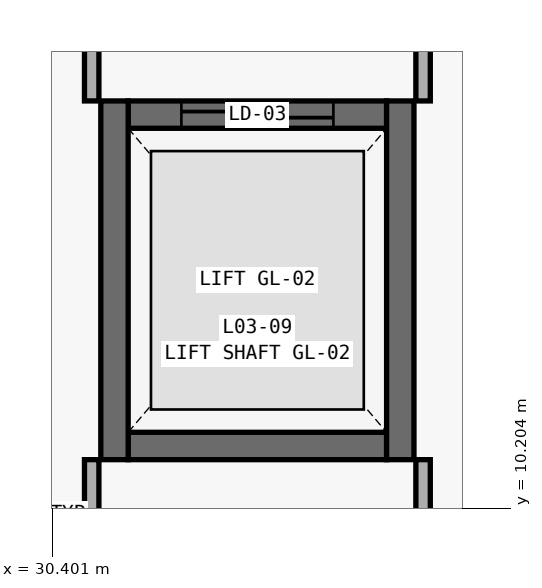
"""IFC4 building model, lengths in metres.
Left out: names, types, materials, properties, quantities, classifications, styles, units other than length and angle.
Written with IfcOpenShell. Run it as: python <this file> out.ifc"""

import sys

from ifc_helpers import new_model, si_unit, direction, frame, frame_2d, origin, place, context, subcontext, project, spatial, rectangle, extrude, element, fill, save


model = new_model("IFC4")
c1 = context("Model", 3, precision=1e-05, world=origin(), true_north=direction((0.0, 1.0)))
c2 = subcontext(c1, "Body", "Model", "MODEL_VIEW")
j1 = project(units=[si_unit("LENGTHUNIT", "METRE"), si_unit("PLANEANGLEUNIT", "RADIAN")], contexts=[c1])
p1 = place(None, origin())
s1 = spatial("IfcSite", under=j1, at=p1, CompositionType="ELEMENT")
p2 = place(p1, origin())
s2 = spatial("IfcBuilding", under=s1, at=p2, CompositionType="ELEMENT")
p3 = place(p2, frame((0.0, 0.0, 17.1)))
s3 = spatial("IfcBuildingStorey", under=s2, at=p3, CompositionType="ELEMENT", Elevation=17.1)
p4 = place(p3, frame((31.4, 15.38, 0.0), z_axis=(0.0, 0.0, 1.0), x_axis=(1.0, 0.0, 0.0)))
e1 = element("IfcWall", 1, at=p4, inside=s3, PredefinedType="SHEAR", context=c2, shape_type="SweptSolid", body=[
    extrude(rectangle(XDim=3.4, YDim=0.36, at=frame_2d((1.7, 0.0))), origin(), (0.0, 0.0, 1.0), 3.94),
])
p5 = place(p4, frame((0.7, 0.0, 0.0)))
e2 = element("IfcOpeningElement", 2, at=p5, cuts=e1, PredefinedType="OPENING", context=c2, shape_type="SweptSolid", body=[
    extrude(rectangle(XDim=2.0, YDim=2.4, at=frame_2d((1.0, 1.2))), frame((0.0, 0.195, 0.0), z_axis=(0.0, -1.0, 0.0), x_axis=(1.0, 0.0, 0.0)), (0.0, 0.0, 1.0), 0.39),
])
p6 = place(p3, frame((31.4, 11.02, 0.0), z_axis=(0.0, 0.0, 1.0), x_axis=(1.0, 0.0, 0.0)))
e3 = element("IfcWall", 3, at=p6, inside=s3, PredefinedType="SHEAR", context=c2, shape_type="SweptSolid", body=[
    extrude(rectangle(XDim=3.4, YDim=0.36, at=frame_2d((1.7, 0.0))), origin(), (0.0, 0.0, 1.0), 3.94),
])
for number, where, z_axis, x_axis in (
    (4, (31.22, 10.84, 0.0), (0.0, 0.0, 1.0), (0.0, 1.0, 0.0)),
    (5, (34.98, 10.84, 0.0), (0.0, 0.0, 1.0), (0.0, 1.0, 0.0)),
):
    element("IfcWall", number, at=place(p3, frame(where, z_axis=z_axis, x_axis=x_axis)), inside=s3, PredefinedType="SHEAR", context=c2, shape_type="SweptSolid", body=[
        extrude(rectangle(XDim=4.72, YDim=0.36, at=frame_2d((2.36, 0.0))), origin(), (0.0, 0.0, 1.0), 3.94),
    ])
p7 = place(p3, frame((30.92, 9.015, 0.0), z_axis=(0.0, 0.0, 1.0), x_axis=(0.0, 1.0, 0.0)))
e6 = element("IfcWall", 6, at=p7, inside=s3, PredefinedType="PARTITIONING", context=c2, shape_type="SweptSolid", body=[
    extrude(rectangle(XDim=1.825, YDim=0.19, at=frame_2d((0.913, 0.0))), origin(), (0.0, 0.0, 1.0), 2.82),
])
p8 = place(p3, frame((30.92, 15.56, 0.0), z_axis=(0.0, 0.0, 1.0), x_axis=(0.0, 1.0, 0.0)))
e7 = element("IfcWall", 7, at=p8, inside=s3, PredefinedType="PARTITIONING", context=c2, shape_type="SweptSolid", body=[
    extrude(rectangle(XDim=0.825, YDim=0.19, at=frame_2d((0.413, 0.0))), origin(), (0.0, 0.0, 1.0), 2.82),
])
p9 = place(p3, frame((35.28, 9.015, 0.0), z_axis=(0.0, 0.0, 1.0), x_axis=(0.0, 1.0, 0.0)))
e8 = element("IfcWall", 8, at=p9, inside=s3, PredefinedType="PARTITIONING", context=c2, shape_type="SweptSolid", body=[
    extrude(rectangle(XDim=1.825, YDim=0.19, at=frame_2d((0.913, 0.0))), origin(), (0.0, 0.0, 1.0), 2.82),
])
p10 = place(p3, frame((35.28, 15.56, 0.0), z_axis=(0.0, 0.0, 1.0), x_axis=(0.0, 1.0, 0.0)))
e9 = element("IfcWall", 9, at=p10, inside=s3, PredefinedType="PARTITIONING", context=c2, shape_type="SweptSolid", body=[
    extrude(rectangle(XDim=0.825, YDim=0.19, at=frame_2d((0.413, 0.0))), origin(), (0.0, 0.0, 1.0), 2.82),
])
p11 = place(p5, origin())
e10 = element("IfcDoor", 10, at=p11, inside=s3, OperationType="DOUBLE_DOOR_SLIDING", PredefinedType="DOOR", context=c2, shape_type="SweptSolid", body=[
    extrude(rectangle(XDim=2.0, YDim=2.4, at=frame_2d((1.0, 1.2))), frame((0.0, 0.025, 0.0), z_axis=(0.0, -1.0, 0.0), x_axis=(1.0, 0.0, 0.0)), (0.0, 0.0, 1.0), 0.05),
])
fill(e2, e10)
save(model, sys.argv[1])
